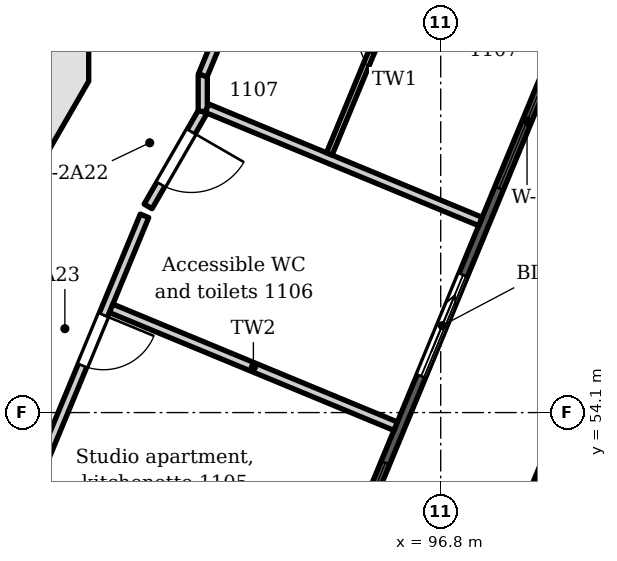
"""IFC4 building model, lengths in metres.
Left out: names, types, materials, properties, quantities, classifications, styles, units other than length and angle.
Written with IfcOpenShell. Run it as: python <this file> out.ifc"""

import sys

from ifc_helpers import new_model, si_unit, direction, frame, frame_2d, origin, place, context, subcontext, project, spatial, polyline, rectangle, outline, extrude, element, fill, save


model = new_model("IFC4")
c1 = context("Model", 3, precision=1e-05, world=origin(), true_north=direction((0.0, 1.0)))
c2 = subcontext(c1, "Body", "Model", "MODEL_VIEW")
j1 = project(units=[si_unit("LENGTHUNIT", "METRE"), si_unit("PLANEANGLEUNIT", "RADIAN")], contexts=[c1])
p1 = place(None, origin())
s1 = spatial("IfcSite", under=j1, at=p1, CompositionType="ELEMENT")
p2 = place(p1, origin())
s2 = spatial("IfcBuilding", under=s1, at=p2, CompositionType="ELEMENT")
p3 = place(p2, frame((0.0, 0.0, 50.4)))
s3 = spatial("IfcBuildingStorey", under=s2, at=p3, CompositionType="ELEMENT", Elevation=50.4)
p4 = place(p3, frame((90.412, 59.55, 0.0), z_axis=(0.0, 0.0, 1.0), x_axis=(0.0, 1.0, 0.0)))
e1 = element("IfcWall", 1, at=p4, inside=s3, PredefinedType="SHEAR", context=c2, shape_type="SweptSolid", body=[
    extrude(outline(polyline([(0.0, -0.6), (5.901, -0.6), (5.58, 0.6), (0.322, 0.6), (0.0, -0.6)])), origin(), (0.0, 0.0, 1.0), 3.6),
])
p5 = place(p4, frame((1.176, 0.0, 0.0)))
e2 = element("IfcOpeningElement", 2, at=p5, cuts=e1, PredefinedType="OPENING", context=c2, shape_type="SweptSolid", body=[
    extrude(rectangle(XDim=0.9, YDim=2.1, at=frame_2d((0.45, 1.05))), frame((0.0, 0.61, 0.0), z_axis=(0.0, -1.0, 0.0), x_axis=(1.0, 0.0, 0.0)), (0.0, 0.0, 1.0), 1.22),
])
p6 = place(p3, frame((87.542, 54.739, 0.0), z_axis=(0.0, 0.0, 1.0), x_axis=(0.499979111662, 0.866037463336, 0.0)))
e3 = element("IfcWall", 3, at=p6, inside=s3, PredefinedType="SHEAR", context=c2, shape_type="SweptSolid", body=[
    extrude(outline(polyline([(0.0, -0.6), (5.901, -0.6), (5.58, 0.6), (0.322, 0.6), (0.0, -0.6)])), origin(), (0.0, 0.0, 1.0), 3.6),
])
p7 = place(p6, frame((2.25, 0.0, 0.0)))
e4 = element("IfcOpeningElement", 4, at=p7, cuts=e3, PredefinedType="OPENING", context=c2, shape_type="SweptSolid", body=[
    extrude(rectangle(XDim=1.4, YDim=2.1, at=frame_2d((0.7, 1.05))), frame((0.0, 0.61, 0.0), z_axis=(0.0, -1.0, 0.0), x_axis=(1.0, 0.0, 0.0)), (0.0, 0.0, 1.0), 1.22),
])
p8 = place(p3, frame((105.889, 77.411, 0.0), z_axis=(0.0, 0.0, 1.0), x_axis=(-0.38268395344, -0.923879316675, 0.0)))
e5 = element("IfcWall", 5, at=p8, inside=s3, PredefinedType="SOLIDWALL", context=c2, shape_type="SweptSolid", body=[
    extrude(outline(polyline([(0.149, 0.075), (0.149, -0.075), (47.217, -0.075), (47.217, 0.075), (0.149, 0.075)])), origin(), (0.0, 0.0, 1.0), 3.3),
])
p9 = place(p8, frame((1.222, 0.0, 0.0)))
e6 = element("IfcOpeningElement", 6, at=p9, cuts=e5, PredefinedType="OPENING", context=c2, shape_type="SweptSolid", body=[
    extrude(rectangle(XDim=1.8, YDim=2.6, at=frame_2d((0.9, 1.3))), frame((0.0, 0.085, 0.0), z_axis=(0.0, -1.0, 0.0), x_axis=(1.0, 0.0, 0.0)), (0.0, 0.0, 1.0), 0.17),
])
p10 = place(p8, frame((4.565, 0.0, 0.0)))
e7 = element("IfcOpeningElement", 7, at=p10, cuts=e5, PredefinedType="OPENING", context=c2, shape_type="SweptSolid", body=[
    extrude(rectangle(XDim=1.8, YDim=2.6, at=frame_2d((0.9, 1.3))), frame((0.0, 0.085, 0.0), z_axis=(0.0, -1.0, 0.0), x_axis=(1.0, 0.0, 0.0)), (0.0, 0.0, 1.0), 0.17),
])
p11 = place(p8, frame((8.209, 0.0, 0.0)))
e8 = element("IfcOpeningElement", 8, at=p11, cuts=e5, PredefinedType="OPENING", context=c2, shape_type="SweptSolid", body=[
    extrude(rectangle(XDim=1.8, YDim=2.6, at=frame_2d((0.9, 1.3))), frame((0.0, 0.085, 0.0), z_axis=(0.0, -1.0, 0.0), x_axis=(1.0, 0.0, 0.0)), (0.0, 0.0, 1.0), 0.17),
])
p12 = place(p8, frame((12.453, 0.0, 0.0)))
e9 = element("IfcOpeningElement", 9, at=p12, cuts=e5, PredefinedType="OPENING", context=c2, shape_type="SweptSolid", body=[
    extrude(rectangle(XDim=1.8, YDim=2.6, at=frame_2d((0.9, 1.3))), frame((0.0, 0.085, 0.0), z_axis=(0.0, -1.0, 0.0), x_axis=(1.0, 0.0, 0.0)), (0.0, 0.0, 1.0), 0.17),
])
p13 = place(p8, frame((15.496, 0.0, 0.0)))
e10 = element("IfcOpeningElement", 10, at=p13, cuts=e5, PredefinedType="OPENING", context=c2, shape_type="SweptSolid", body=[
    extrude(rectangle(XDim=1.8, YDim=2.6, at=frame_2d((0.9, 1.3))), frame((0.0, 0.085, 0.0), z_axis=(0.0, -1.0, 0.0), x_axis=(1.0, 0.0, 0.0)), (0.0, 0.0, 1.0), 0.17),
])
p14 = place(p8, frame((18.84, 0.0, 0.15)))
e11 = element("IfcOpeningElement", 11, at=p14, cuts=e5, PredefinedType="OPENING", context=c2, shape_type="SweptSolid", body=[
    extrude(rectangle(XDim=2.4, YDim=2.45, at=frame_2d((1.2, 1.225))), frame((0.0, 0.085, 0.0), z_axis=(0.0, -1.0, 0.0), x_axis=(1.0, 0.0, 0.0)), (0.0, 0.0, 1.0), 0.17),
])
p15 = place(p8, frame((22.783, 0.0, 0.0)))
e12 = element("IfcOpeningElement", 12, at=p15, cuts=e5, PredefinedType="OPENING", context=c2, shape_type="SweptSolid", body=[
    extrude(rectangle(XDim=1.8, YDim=2.6, at=frame_2d((0.9, 1.3))), frame((0.0, 0.085, 0.0), z_axis=(0.0, -1.0, 0.0), x_axis=(1.0, 0.0, 0.0)), (0.0, 0.0, 1.0), 0.17),
])
p16 = place(p8, frame((26.127, 0.0, 0.15)))
e13 = element("IfcOpeningElement", 13, at=p16, cuts=e5, PredefinedType="OPENING", context=c2, shape_type="SweptSolid", body=[
    extrude(rectangle(XDim=2.4, YDim=2.45, at=frame_2d((1.2, 1.225))), frame((0.0, 0.085, 0.0), z_axis=(0.0, -1.0, 0.0), x_axis=(1.0, 0.0, 0.0)), (0.0, 0.0, 1.0), 0.17),
])
p17 = place(p8, frame((30.071, 0.0, 0.0)))
e14 = element("IfcOpeningElement", 14, at=p17, cuts=e5, PredefinedType="OPENING", context=c2, shape_type="SweptSolid", body=[
    extrude(rectangle(XDim=1.8, YDim=2.6, at=frame_2d((0.9, 1.3))), frame((0.0, 0.085, 0.0), z_axis=(0.0, -1.0, 0.0), x_axis=(1.0, 0.0, 0.0)), (0.0, 0.0, 1.0), 0.17),
])
p18 = place(p8, frame((33.114, 0.0, 0.0)))
e15 = element("IfcOpeningElement", 15, at=p18, cuts=e5, PredefinedType="OPENING", context=c2, shape_type="SweptSolid", body=[
    extrude(rectangle(XDim=1.8, YDim=2.6, at=frame_2d((0.9, 1.3))), frame((0.0, 0.085, 0.0), z_axis=(0.0, -1.0, 0.0), x_axis=(1.0, 0.0, 0.0)), (0.0, 0.0, 1.0), 0.17),
])
p19 = place(p8, frame((37.358, 0.0, 0.0)))
e16 = element("IfcOpeningElement", 16, at=p19, cuts=e5, PredefinedType="OPENING", context=c2, shape_type="SweptSolid", body=[
    extrude(rectangle(XDim=1.8, YDim=2.6, at=frame_2d((0.9, 1.3))), frame((0.0, 0.085, 0.0), z_axis=(0.0, -1.0, 0.0), x_axis=(1.0, 0.0, 0.0)), (0.0, 0.0, 1.0), 0.17),
])
p20 = place(p8, frame((41.001, 0.0, 0.0)))
e17 = element("IfcOpeningElement", 17, at=p20, cuts=e5, PredefinedType="OPENING", context=c2, shape_type="SweptSolid", body=[
    extrude(rectangle(XDim=1.8, YDim=2.6, at=frame_2d((0.9, 1.3))), frame((0.0, 0.085, 0.0), z_axis=(0.0, -1.0, 0.0), x_axis=(1.0, 0.0, 0.0)), (0.0, 0.0, 1.0), 0.17),
])
p21 = place(p8, frame((44.345, 0.0, 0.0)))
e18 = element("IfcOpeningElement", 18, at=p21, cuts=e5, PredefinedType="OPENING", context=c2, shape_type="SweptSolid", body=[
    extrude(rectangle(XDim=1.8, YDim=2.6, at=frame_2d((0.9, 1.3))), frame((0.0, 0.085, 0.0), z_axis=(0.0, -1.0, 0.0), x_axis=(1.0, 0.0, 0.0)), (0.0, 0.0, 1.0), 0.17),
])
p22 = place(p3, origin())
e19 = element("IfcWall", 19, at=p22, inside=s3, PredefinedType="PARAPET", context=c2, shape_type="SweptSolid", body=[
    extrude(outline(polyline([(97.885, 51.908), (112.536, 77.285), (112.189, 77.285), (98.764, 54.032), (97.885, 51.908)])), origin(), (0.0, 0.0, 1.0), 1.1),
])
p23 = place(p3, frame((87.811, 47.393, 0.0), z_axis=(0.0, 0.0, 1.0), x_axis=(0.382671722525, 0.923884382799, 0.0)))
e20 = element("IfcWall", 20, at=p23, inside=s3, PredefinedType="PARTITIONING", context=c2, shape_type="SweptSolid", body=[
    extrude(rectangle(XDim=10.761, YDim=0.15, at=frame_2d((5.38, 0.0))), origin(), (0.0, 0.0, 1.0), 3.3),
])
p24 = place(p23, frame((8.096, 0.0, 0.0)))
e21 = element("IfcOpeningElement", 21, at=p24, cuts=e20, PredefinedType="OPENING", context=c2, shape_type="SweptSolid", body=[
    extrude(rectangle(XDim=0.9, YDim=2.1, at=frame_2d((0.45, 1.05))), frame((0.0, 0.085, 0.0), z_axis=(0.0, -1.0, 0.0), x_axis=(1.0, 0.0, 0.0)), (0.0, 0.0, 1.0), 0.17),
])
p25 = place(p3, frame((91.38, 55.814, 0.0), z_axis=(0.0, 0.0, 1.0), x_axis=(0.923879340067, -0.382683896966, 0.0)))
e22 = element("IfcWall", 22, at=p25, inside=s3, PredefinedType="PARTITIONING", context=c2, shape_type="SweptSolid", body=[
    extrude(rectangle(XDim=5.064, YDim=0.15, at=frame_2d((2.532, 0.0))), origin(), (0.0, 0.0, 1.0), 3.3),
])
p26 = place(p3, frame((91.988, 57.491, 0.0), z_axis=(0.0, 0.0, 1.0), x_axis=(0.500200642588, 0.865909531738, 0.0)))
e23 = element("IfcWall", 23, at=p26, inside=s3, PredefinedType="PARTITIONING", context=c2, shape_type="SweptSolid", body=[
    extrude(rectangle(XDim=1.797, YDim=0.15, at=frame_2d((0.898, 0.0))), origin(), (0.0, 0.0, 1.0), 3.3),
])
p27 = place(p26, frame((0.419, 0.0, 0.0)))
e24 = element("IfcOpeningElement", 24, at=p27, cuts=e23, PredefinedType="OPENING", context=c2, shape_type="SweptSolid", body=[
    extrude(rectangle(XDim=1.0, YDim=2.1, at=frame_2d((0.5, 1.05))), frame((0.0, 0.085, 0.0), z_axis=(0.0, -1.0, 0.0), x_axis=(1.0, 0.0, 0.0)), (0.0, 0.0, 1.0), 0.17),
])
p28 = place(p3, frame((92.887, 59.054, 0.0), z_axis=(0.0, 0.0, 1.0), x_axis=(0.0, 1.0, 0.0)))
e25 = element("IfcWall", 25, at=p28, inside=s3, PredefinedType="PARTITIONING", context=c2, shape_type="SweptSolid", body=[
    extrude(rectangle(XDim=0.604, YDim=0.15, at=frame_2d((0.302, 0.0))), origin(), (0.0, 0.0, 1.0), 3.3),
])
p29 = place(p3, frame((92.956, 59.105, 0.0), z_axis=(0.0, 0.0, 1.0), x_axis=(0.923843801062, -0.382769684325, 0.0)))
e26 = element("IfcWall", 26, at=p29, inside=s3, PredefinedType="PARTITIONING", context=c2, shape_type="SweptSolid", body=[
    extrude(rectangle(XDim=4.867, YDim=0.15, at=frame_2d((2.434, 0.0))), origin(), (0.0, 0.0, 1.0), 3.3),
])
p30 = place(p3, frame((92.887, 59.646, 0.0), z_axis=(0.0, 0.0, 1.0), x_axis=(0.382283814647, 0.924044958354, 0.0)))
e27 = element("IfcWall", 27, at=p30, inside=s3, PredefinedType="PARTITIONING", context=c2, shape_type="SweptSolid", body=[
    extrude(rectangle(XDim=1.48, YDim=0.15, at=frame_2d((0.74, 0.0))), origin(), (0.0, 0.0, 1.0), 3.3),
])
p31 = place(p3, frame((93.521, 60.981, 0.0), z_axis=(0.0, 0.0, 1.0), x_axis=(0.9238961731, -0.38264325596, 0.0)))
e28 = element("IfcWall", 28, at=p31, inside=s3, PredefinedType="PARTITIONING", context=c2, shape_type="SweptSolid", body=[
    extrude(rectangle(XDim=2.392, YDim=0.1, at=frame_2d((1.196, 0.0))), origin(), (0.0, 0.0, 1.0), 3.3),
])
p32 = place(p31, frame((0.771, 0.0, 0.0)))
e29 = element("IfcOpeningElement", 29, at=p32, cuts=e28, PredefinedType="OPENING", context=c2, shape_type="SweptSolid", body=[
    extrude(rectangle(XDim=0.8, YDim=2.1, at=frame_2d((0.4, 1.05))), frame((0.0, 0.06, 0.0), z_axis=(0.0, -1.0, 0.0), x_axis=(1.0, 0.0, 0.0)), (0.0, 0.0, 1.0), 0.12),
])
p33 = place(p3, frame((94.968, 58.353, 0.0), z_axis=(0.0, 0.0, 1.0), x_axis=(0.382714221705, 0.923866778548, 0.0)))
e30 = element("IfcWall", 30, at=p33, inside=s3, PredefinedType="PARTITIONING", context=c2, shape_type="SweptSolid", body=[
    extrude(rectangle(XDim=1.824, YDim=0.1, at=frame_2d((0.912, 0.0))), origin(), (0.0, 0.0, 1.0), 3.3),
])
p34 = place(p14, origin())
e31 = element("IfcWindow", 31, at=p34, inside=s3, PartitioningType="SINGLE_PANEL", PredefinedType="WINDOW", context=c2, shape_type="SweptSolid", body=[
    extrude(rectangle(XDim=2.4, YDim=2.45, at=frame_2d((1.2, 1.225))), frame((0.0, 0.03, 0.0), z_axis=(0.0, -1.0, 0.0), x_axis=(1.0, 0.0, 0.0)), (0.0, 0.0, 1.0), 0.06),
])
fill(e11, e31)
p35 = place(p15, origin())
e32 = element("IfcDoor", 32, at=p35, inside=s3, OperationType="SLIDING_TO_LEFT", PredefinedType="DOOR", context=c2, shape_type="SweptSolid", body=[
    extrude(rectangle(XDim=1.8, YDim=2.6, at=frame_2d((0.9, 1.3))), frame((0.0, 0.025, 0.0), z_axis=(0.0, -1.0, 0.0), x_axis=(1.0, 0.0, 0.0)), (0.0, 0.0, 1.0), 0.05),
])
fill(e12, e32)
p36 = place(p16, origin())
e33 = element("IfcWindow", 33, at=p36, inside=s3, PartitioningType="SINGLE_PANEL", PredefinedType="WINDOW", context=c2, shape_type="SweptSolid", body=[
    extrude(rectangle(XDim=2.4, YDim=2.45, at=frame_2d((1.2, 1.225))), frame((0.0, 0.03, 0.0), z_axis=(0.0, -1.0, 0.0), x_axis=(1.0, 0.0, 0.0)), (0.0, 0.0, 1.0), 0.06),
])
fill(e13, e33)
p37 = place(p27, frame((1.0, 0.0, 0.0), z_axis=(0.0, 0.0, 1.0), x_axis=(-1.0, 0.0, 0.0)))
e34 = element("IfcDoor", 34, at=p37, inside=s3, OperationType="SINGLE_SWING_LEFT", PredefinedType="DOOR", context=c2, shape_type="SweptSolid", body=[
    extrude(rectangle(XDim=1.0, YDim=2.1, at=frame_2d((0.5, 1.05))), frame((0.0, 0.025, 0.0), z_axis=(0.0, -1.0, 0.0), x_axis=(1.0, 0.0, 0.0)), (0.0, 0.0, 1.0), 0.05),
])
fill(e24, e34)
p38 = place(p24, frame((0.9, 0.0, 0.0), z_axis=(0.0, 0.0, 1.0), x_axis=(-1.0, 0.0, 0.0)))
e35 = element("IfcDoor", 35, at=p38, inside=s3, OperationType="SINGLE_SWING_LEFT", PredefinedType="DOOR", context=c2, shape_type="SweptSolid", body=[
    extrude(rectangle(XDim=0.9, YDim=2.1, at=frame_2d((0.45, 1.05))), frame((0.0, 0.025, 0.0), z_axis=(0.0, -1.0, 0.0), x_axis=(1.0, 0.0, 0.0)), (0.0, 0.0, 1.0), 0.05),
])
fill(e21, e35)
save(model, sys.argv[1])
